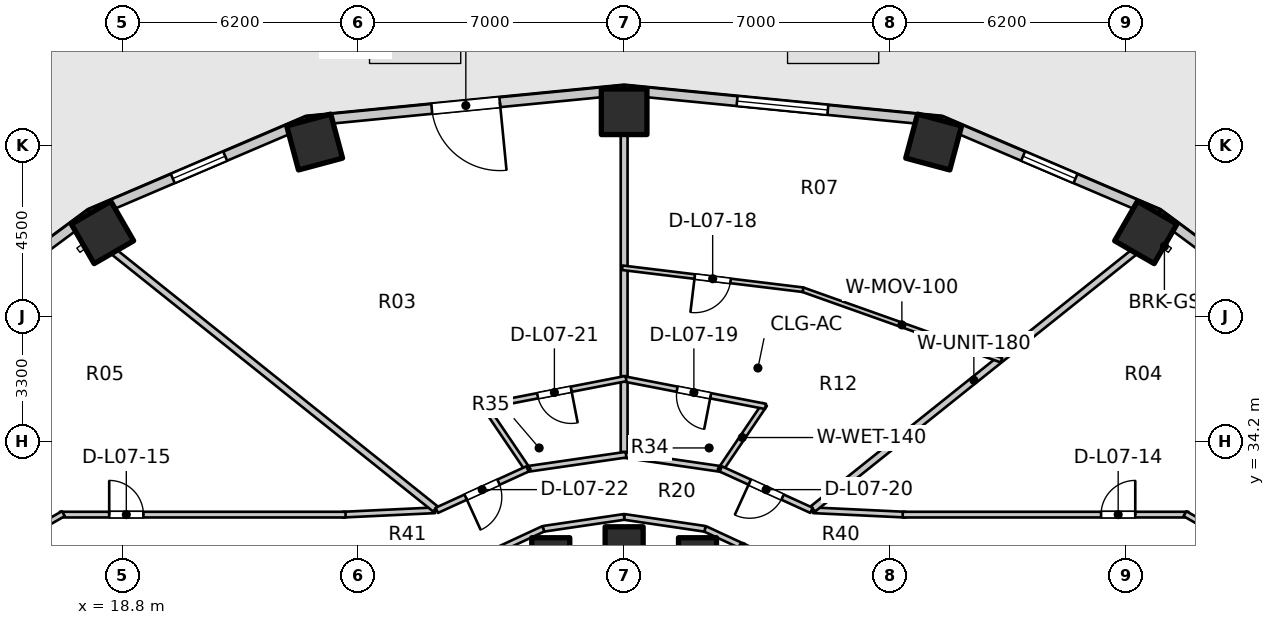
"""IFC4 building model, lengths in metres.
Left out: names, types, materials, properties, quantities, classifications, styles, units other than length and angle.
Written with IfcOpenShell. Run it as: python <this file> out.ifc"""

import sys

from ifc_helpers import new_model, si_unit, direction, frame, frame_2d, origin, origin_2d, place, context, subcontext, project, spatial, rectangle, extrude, element, fill, save


model = new_model("IFC4")
c1 = context("Model", 3, precision=1e-05, world=origin(), true_north=direction((0.0, 1.0)))
c2 = subcontext(c1, "Body", "Model", "MODEL_VIEW")
j1 = project(units=[si_unit("LENGTHUNIT", "METRE"), si_unit("PLANEANGLEUNIT", "RADIAN")], contexts=[c1])
p1 = place(None, origin())
s1 = spatial("IfcSite", under=j1, at=p1, CompositionType="ELEMENT")
p2 = place(p1, origin())
s2 = spatial("IfcBuilding", under=s1, at=p2, CompositionType="ELEMENT")
p3 = place(p2, frame((0.0, 0.0, 27.6)))
s3 = spatial("IfcBuildingStorey", under=s2, at=p3, CompositionType="ELEMENT", Elevation=27.6)
p4 = place(p3, frame((45.727, 39.704, 0.0), z_axis=(0.0, 0.0, 1.0), x_axis=(0.5, 0.866025403784, 0.0)))
e1 = element("IfcColumn", 1, at=p4, inside=s3, PredefinedType="COLUMN", context=c2, shape_type="SweptSolid", body=[
    extrude(rectangle(XDim=1.2, YDim=1.2, at=origin_2d()), origin(), (0.0, 0.0, 1.0), 3.1),
])
p5 = place(p3, frame((33.931, 31.172, 0.0), z_axis=(0.0, 0.0, 1.0), x_axis=(1.0, 0.0, 0.0)))
e2 = element("IfcColumn", 2, at=p5, inside=s3, PredefinedType="COLUMN", context=c2, shape_type="SweptSolid", body=[
    extrude(rectangle(XDim=1.0, YDim=1.0, at=origin_2d()), origin(), (0.0, 0.0, 1.0), 3.1),
])
p6 = place(p3, frame((40.145, 42.084, 0.0), z_axis=(0.0, 0.0, 1.0), x_axis=(0.258819045103, 0.965925826289, 0.0)))
e3 = element("IfcColumn", 3, at=p6, inside=s3, PredefinedType="COLUMN", context=c2, shape_type="SweptSolid", body=[
    extrude(rectangle(XDim=1.2, YDim=1.2, at=origin_2d()), origin(), (0.0, 0.0, 1.0), 3.1),
])
p7 = place(p3, frame((32.0, 31.46, 0.0), z_axis=(0.0, 0.0, 1.0), x_axis=(1.0, 0.0, 0.0)))
e4 = element("IfcColumn", 4, at=p7, inside=s3, PredefinedType="COLUMN", context=c2, shape_type="SweptSolid", body=[
    extrude(rectangle(XDim=1.0, YDim=1.0, at=origin_2d()), origin(), (0.0, 0.0, 1.0), 3.1),
])
p8 = place(p3, frame((32.0, 42.88, 0.0), z_axis=(0.0, 0.0, 1.0), x_axis=(0.0, 1.0, 0.0)))
e5 = element("IfcColumn", 5, at=p8, inside=s3, PredefinedType="COLUMN", context=c2, shape_type="SweptSolid", body=[
    extrude(rectangle(XDim=1.2, YDim=1.2, at=origin_2d()), origin(), (0.0, 0.0, 1.0), 3.1),
])
p9 = place(p3, frame((30.069, 31.172, 0.0), z_axis=(0.0, 0.0, 1.0), x_axis=(1.0, 0.0, 0.0)))
e6 = element("IfcColumn", 6, at=p9, inside=s3, PredefinedType="COLUMN", context=c2, shape_type="SweptSolid", body=[
    extrude(rectangle(XDim=1.0, YDim=1.0, at=origin_2d()), origin(), (0.0, 0.0, 1.0), 3.1),
])
for number, where, z_axis, x_axis in (
    (7, (23.855, 42.084, 0.0), (0.0, 0.0, 1.0), (-0.259, 0.966, 0.0)),
    (8, (18.273, 39.704, 0.0), (0.0, 0.0, 1.0), (-0.5, 0.866, 0.0)),
):
    element("IfcColumn", number, at=place(p3, frame(where, z_axis=z_axis, x_axis=x_axis)), inside=s3, PredefinedType="COLUMN", context=c2, shape_type="SweptSolid", body=[
        extrude(rectangle(XDim=1.2, YDim=1.2, at=origin_2d()), origin(), (0.0, 0.0, 1.0), 3.1),
    ])
p10 = place(p3, frame((50.405, 36.965, 0.0), z_axis=(0.0, 0.0, 1.0), x_axis=(-0.803477531792, 0.595335078679, 0.0)))
e9 = element("IfcWall", 9, at=p10, inside=s3, PredefinedType="STANDARD", context=c2, shape_type="SweptSolid", body=[
    extrude(rectangle(XDim=5.43, YDim=0.26, at=frame_2d((2.715, 0.0))), origin(), (0.0, 0.0, 1.0), 2.85),
])
p11 = place(p3, frame((46.042, 40.197, 0.0), z_axis=(0.0, 0.0, 1.0), x_axis=(-0.919612132394, 0.39282760335, 0.0)))
e10 = element("IfcWall", 10, at=p11, inside=s3, PredefinedType="STANDARD", context=c2, shape_type="SweptSolid", body=[
    extrude(rectangle(XDim=6.209, YDim=0.26, at=frame_2d((3.105, 0.0))), origin(), (0.0, 0.0, 1.0), 2.85),
])
p12 = place(p11, frame((2.355, 0.0, 0.75)))
e11 = element("IfcOpeningElement", 11, at=p12, cuts=e10, PredefinedType="OPENING", context=c2, shape_type="SweptSolid", body=[
    extrude(rectangle(XDim=1.5, YDim=1.6, at=frame_2d((0.75, 0.8))), frame((0.0, 0.14, 0.0), z_axis=(0.0, -1.0, 0.0), x_axis=(1.0, 0.0, 0.0)), (0.0, 0.0, 1.0), 0.28),
])
p13 = place(p3, frame((40.332, 42.636, 0.0), z_axis=(0.0, 0.0, 1.0), x_axis=(-0.995247718352, 0.097375454379, 0.0)))
e12 = element("IfcWall", 12, at=p13, inside=s3, PredefinedType="STANDARD", context=c2, shape_type="SweptSolid", body=[
    extrude(rectangle(XDim=8.372, YDim=0.26, at=frame_2d((4.186, 0.0))), origin(), (0.0, 0.0, 1.0), 2.85),
])
p14 = place(p13, frame((2.986, 0.0, 0.75)))
e13 = element("IfcOpeningElement", 13, at=p14, cuts=e12, PredefinedType="OPENING", context=c2, shape_type="SweptSolid", body=[
    extrude(rectangle(XDim=2.4, YDim=1.7, at=frame_2d((1.2, 0.85))), frame((0.0, 0.14, 0.0), z_axis=(0.0, -1.0, 0.0), x_axis=(1.0, 0.0, 0.0)), (0.0, 0.0, 1.0), 0.28),
])
p15 = place(p3, frame((32.0, 43.451, 0.0), z_axis=(0.0, 0.0, 1.0), x_axis=(-0.995247718352, -0.097375454379, 0.0)))
e14 = element("IfcWall", 14, at=p15, inside=s3, PredefinedType="STANDARD", context=c2, shape_type="SweptSolid", body=[
    extrude(rectangle(XDim=8.372, YDim=0.26, at=frame_2d((4.186, 0.0))), origin(), (0.0, 0.0, 1.0), 2.88),
])
p16 = place(p15, frame((3.286, 0.0, 0.0)))
e15 = element("IfcOpeningElement", 15, at=p16, cuts=e14, PredefinedType="OPENING", context=c2, shape_type="SweptSolid", body=[
    extrude(rectangle(XDim=1.8, YDim=2.35, at=frame_2d((0.9, 1.175))), frame((0.0, 0.14, 0.0), z_axis=(0.0, -1.0, 0.0), x_axis=(1.0, 0.0, 0.0)), (0.0, 0.0, 1.0), 0.28),
])
p17 = place(p3, frame((23.668, 42.636, 0.0), z_axis=(0.0, 0.0, 1.0), x_axis=(-0.919612132394, -0.39282760335, 0.0)))
e16 = element("IfcWall", 16, at=p17, inside=s3, PredefinedType="STANDARD", context=c2, shape_type="SweptSolid", body=[
    extrude(rectangle(XDim=6.209, YDim=0.26, at=frame_2d((3.105, 0.0))), origin(), (0.0, 0.0, 1.0), 2.85),
])
p18 = place(p17, frame((2.355, 0.0, 0.75)))
e17 = element("IfcOpeningElement", 17, at=p18, cuts=e16, PredefinedType="OPENING", context=c2, shape_type="SweptSolid", body=[
    extrude(rectangle(XDim=1.5, YDim=1.6, at=frame_2d((0.75, 0.8))), frame((0.0, 0.14, 0.0), z_axis=(0.0, -1.0, 0.0), x_axis=(1.0, 0.0, 0.0)), (0.0, 0.0, 1.0), 0.28),
])
p19 = place(p3, frame((17.958, 40.197, 0.0), z_axis=(0.0, 0.0, 1.0), x_axis=(-0.803477531792, -0.595335078679, 0.0)))
e18 = element("IfcWall", 18, at=p19, inside=s3, PredefinedType="STANDARD", context=c2, shape_type="SweptSolid", body=[
    extrude(rectangle(XDim=5.43, YDim=0.26, at=frame_2d((2.715, 0.0))), origin(), (0.0, 0.0, 1.0), 2.85),
])
p20 = place(p3, frame((36.11, 30.985, 0.0), z_axis=(0.0, 0.0, 1.0), x_axis=(-0.906943449489, 0.421252393975, 0.0)))
e19 = element("IfcWall", 19, at=p20, inside=s3, PredefinedType="PARTITIONING", context=c2, shape_type="SweptSolid", body=[
    extrude(rectangle(XDim=2.186, YDim=0.15, at=frame_2d((1.093, 0.0))), origin(), (0.0, 0.0, 1.0), 2.237),
])
for number, where, z_axis, x_axis in (
    (20, (34.127, 31.906, 0.0), (0.0, 0.0, 1.0), (-0.989, 0.146, 0.0)),
    (21, (32.0, 32.22, 0.0), (0.0, 0.0, 1.0), (-0.989, -0.146, 0.0)),
):
    element("IfcWall", number, at=place(p3, frame(where, z_axis=z_axis, x_axis=x_axis)), inside=s3, PredefinedType="PARTITIONING", context=c2, shape_type="SweptSolid", body=[
        extrude(rectangle(XDim=2.151, YDim=0.15, at=frame_2d((1.075, 0.0))), origin(), (0.0, 0.0, 1.0), 2.237),
    ])
p21 = place(p3, frame((29.873, 31.906, 0.0), z_axis=(0.0, 0.0, 1.0), x_axis=(-0.906943449489, -0.421252393975, 0.0)))
e22 = element("IfcWall", 22, at=p21, inside=s3, PredefinedType="PARTITIONING", context=c2, shape_type="SweptSolid", body=[
    extrude(rectangle(XDim=2.186, YDim=0.15, at=frame_2d((1.093, 0.0))), origin(), (0.0, 0.0, 1.0), 2.237),
])
p22 = place(p3, frame((36.98, 32.394, 0.0), z_axis=(0.0, 0.0, 1.0), x_axis=(0.998877427952, -0.047369651964, 0.0)))
e23 = element("IfcWall", 23, at=p22, inside=s3, PredefinedType="PARTITIONING", context=c2, shape_type="SweptSolid", body=[
    extrude(rectangle(XDim=2.433, YDim=0.15, at=frame_2d((1.216, 0.0))), origin(), (0.0, 0.0, 1.0), 2.237),
])
p23 = place(p3, frame((39.33, 32.28, 0.0), z_axis=(0.0, 0.0, 1.0), x_axis=(1.0, 0.0, 0.0)))
e24 = element("IfcWall", 24, at=p23, inside=s3, PredefinedType="PARTITIONING", context=c2, shape_type="SweptSolid", body=[
    extrude(rectangle(XDim=7.52, YDim=0.15, at=frame_2d((3.76, 0.0))), origin(), (0.0, 0.0, 1.0), 2.237),
])
p24 = place(p23, frame((5.22, 0.0, 0.0)))
e25 = element("IfcOpeningElement", 25, at=p24, cuts=e24, PredefinedType="OPENING", context=c2, shape_type="SweptSolid", body=[
    extrude(rectangle(XDim=0.9, YDim=2.1, at=frame_2d((0.45, 1.05))), frame((0.0, 0.085, 0.0), z_axis=(0.0, -1.0, 0.0), x_axis=(1.0, 0.0, 0.0)), (0.0, 0.0, 1.0), 0.17),
])
p25 = place(p3, frame((46.757, 32.305, 0.0), z_axis=(0.0, 0.0, 1.0), x_axis=(0.867991349648, -0.496579315857, 0.0)))
e26 = element("IfcWall", 26, at=p25, inside=s3, PredefinedType="PARTITIONING", context=c2, shape_type="SweptSolid", body=[
    extrude(rectangle(XDim=2.567, YDim=0.15, at=frame_2d((1.283, 0.0))), origin(), (0.0, 0.0, 1.0), 2.069),
])
p26 = place(p3, frame((27.02, 32.394, 0.0), z_axis=(0.0, 0.0, 1.0), x_axis=(-0.998877427952, -0.047369651964, 0.0)))
e27 = element("IfcWall", 27, at=p26, inside=s3, PredefinedType="PARTITIONING", context=c2, shape_type="SweptSolid", body=[
    extrude(rectangle(XDim=2.433, YDim=0.15, at=frame_2d((1.216, 0.0))), origin(), (0.0, 0.0, 1.0), 2.237),
])
p27 = place(p3, frame((17.15, 32.28, 0.0), z_axis=(0.0, 0.0, 1.0), x_axis=(1.0, 0.0, 0.0)))
e28 = element("IfcWall", 28, at=p27, inside=s3, PredefinedType="PARTITIONING", context=c2, shape_type="SweptSolid", body=[
    extrude(rectangle(XDim=7.52, YDim=0.15, at=frame_2d((3.76, 0.0))), origin(), (0.0, 0.0, 1.0), 2.237),
])
p28 = place(p27, frame((1.3, 0.0, 0.0)))
e29 = element("IfcOpeningElement", 29, at=p28, cuts=e28, PredefinedType="OPENING", context=c2, shape_type="SweptSolid", body=[
    extrude(rectangle(XDim=0.9, YDim=2.1, at=frame_2d((0.45, 1.05))), frame((0.0, 0.085, 0.0), z_axis=(0.0, -1.0, 0.0), x_axis=(1.0, 0.0, 0.0)), (0.0, 0.0, 1.0), 0.17),
])
p29 = place(p3, frame((17.243, 32.305, 0.0), z_axis=(0.0, 0.0, 1.0), x_axis=(-0.867991349648, -0.496579315857, 0.0)))
e30 = element("IfcWall", 30, at=p29, inside=s3, PredefinedType="PARTITIONING", context=c2, shape_type="SweptSolid", body=[
    extrude(rectangle(XDim=2.567, YDim=0.15, at=frame_2d((1.283, 0.0))), origin(), (0.0, 0.0, 1.0), 2.069),
])
p30 = place(p3, frame((36.968, 32.431, 0.0), z_axis=(0.0, 0.0, 1.0), x_axis=(0.781055486744, 0.624461629428, 0.0)))
e31 = element("IfcWall", 31, at=p30, inside=s3, PredefinedType="PARTITIONING", context=c2, shape_type="SweptSolid", body=[
    extrude(rectangle(XDim=10.843, YDim=0.18, at=frame_2d((5.422, 0.0))), origin(), (0.0, 0.0, 1.0), 2.237),
])
p31 = place(p3, frame((32.0, 33.905, 0.0), z_axis=(0.0, 0.0, 1.0), x_axis=(0.0, 1.0, 0.0)))
e32 = element("IfcWall", 32, at=p31, inside=s3, PredefinedType="PARTITIONING", context=c2, shape_type="SweptSolid", body=[
    extrude(rectangle(XDim=8.395, YDim=0.18, at=frame_2d((4.198, 0.0))), origin(), (0.0, 0.0, 1.0), 2.237),
])
p32 = place(p3, frame((27.032, 32.431, 0.0), z_axis=(0.0, 0.0, 1.0), x_axis=(-0.781055486744, 0.624461629428, 0.0)))
e33 = element("IfcWall", 33, at=p32, inside=s3, PredefinedType="PARTITIONING", context=c2, shape_type="SweptSolid", body=[
    extrude(rectangle(XDim=10.843, YDim=0.18, at=frame_2d((5.422, 0.0))), origin(), (0.0, 0.0, 1.0), 2.237),
])
p33 = place(p3, frame((41.928, 36.342, 0.0), z_axis=(0.0, 0.0, 1.0), x_axis=(-0.942369240096, 0.334574678243, 0.0)))
e34 = element("IfcWall", 34, at=p33, inside=s3, PredefinedType="MOVABLE", context=c2, shape_type="SweptSolid", body=[
    extrude(rectangle(XDim=5.559, YDim=0.12, at=frame_2d((2.779, 0.0))), origin(), (0.0, 0.0, 1.0), 2.237),
])
p34 = place(p3, frame((36.708, 38.197, 0.0), z_axis=(0.0, 0.0, 1.0), x_axis=(-0.992699076447, 0.120617343785, 0.0)))
e35 = element("IfcWall", 35, at=p34, inside=s3, PredefinedType="MOVABLE", context=c2, shape_type="SweptSolid", body=[
    extrude(rectangle(XDim=4.793, YDim=0.12, at=frame_2d((2.396, 0.0))), origin(), (0.0, 0.0, 1.0), 2.237),
])
p35 = place(p34, frame((1.922, 0.0, 0.0)))
e36 = element("IfcOpeningElement", 36, at=p35, cuts=e35, PredefinedType="OPENING", context=c2, shape_type="SweptSolid", body=[
    extrude(rectangle(XDim=0.95, YDim=2.1, at=frame_2d((0.475, 1.05))), frame((0.0, 0.07, 0.0), z_axis=(0.0, -1.0, 0.0), x_axis=(1.0, 0.0, 0.0)), (0.0, 0.0, 1.0), 0.14),
])
p36 = place(p3, frame((34.599, 33.473, 0.0), z_axis=(0.0, 0.0, 1.0), x_axis=(-0.989649898776, 0.143502884474, 0.0)))
e37 = element("IfcWall", 37, at=p36, inside=s3, PredefinedType="PARTITIONING", context=c2, shape_type="SweptSolid", body=[
    extrude(rectangle(XDim=2.676, YDim=0.15, at=frame_2d((1.338, 0.0))), origin(), (0.0, 0.0, 1.0), 2.237),
])
p37 = place(p3, frame((34.521, 33.439, 0.0), z_axis=(0.0, 0.0, 1.0), x_axis=(0.56056273171, 0.828111963335, 0.0)))
e38 = element("IfcWall", 38, at=p37, inside=s3, PredefinedType="PLUMBINGWALL", context=c2, shape_type="SweptSolid", body=[
    extrude(rectangle(XDim=2.1, YDim=0.14, at=frame_2d((1.05, 0.0))), origin(), (0.0, 0.0, 1.0), 2.855),
])
p38 = place(p3, frame((35.72, 35.127, 0.0), z_axis=(0.0, 0.0, 1.0), x_axis=(-0.981623000654, 0.190830512727, 0.0)))
e39 = element("IfcWall", 39, at=p38, inside=s3, PredefinedType="PLUMBINGWALL", context=c2, shape_type="SweptSolid", body=[
    extrude(rectangle(XDim=3.839, YDim=0.14, at=frame_2d((1.92, 0.0))), origin(), (0.0, 0.0, 1.0), 2.237),
])
p39 = place(p38, frame((1.47, 0.0, 0.0)))
e40 = element("IfcOpeningElement", 40, at=p39, cuts=e39, PredefinedType="OPENING", context=c2, shape_type="SweptSolid", body=[
    extrude(rectangle(XDim=0.9, YDim=2.1, at=frame_2d((0.45, 1.05))), frame((0.0, 0.08, 0.0), z_axis=(0.0, -1.0, 0.0), x_axis=(1.0, 0.0, 0.0)), (0.0, 0.0, 1.0), 0.16),
])
p40 = place(p3, frame((36.931, 32.393, 0.0), z_axis=(0.0, 0.0, 1.0), x_axis=(-0.909747571199, 0.415161843982, 0.0)))
e41 = element("IfcWall", 41, at=p40, inside=s3, PredefinedType="PARTITIONING", context=c2, shape_type="SweptSolid", body=[
    extrude(rectangle(XDim=2.625, YDim=0.15, at=frame_2d((1.312, 0.0))), origin(), (0.0, 0.0, 1.0), 2.237),
])
p41 = place(p40, frame((0.838, 0.0, 0.0)))
e42 = element("IfcOpeningElement", 42, at=p41, cuts=e41, PredefinedType="OPENING", context=c2, shape_type="SweptSolid", body=[
    extrude(rectangle(XDim=0.95, YDim=2.1, at=frame_2d((0.475, 1.05))), frame((0.0, 0.085, 0.0), z_axis=(0.0, -1.0, 0.0), x_axis=(1.0, 0.0, 0.0)), (0.0, 0.0, 1.0), 0.17),
])
p42 = place(p3, frame((32.05, 33.857, 0.0), z_axis=(0.0, 0.0, 1.0), x_axis=(-0.989649898776, -0.143502884474, 0.0)))
e43 = element("IfcWall", 43, at=p42, inside=s3, PredefinedType="PARTITIONING", context=c2, shape_type="SweptSolid", body=[
    extrude(rectangle(XDim=2.676, YDim=0.15, at=frame_2d((1.338, 0.0))), origin(), (0.0, 0.0, 1.0), 2.237),
])
p43 = place(p3, frame((29.479, 33.439, 0.0), z_axis=(0.0, 0.0, 1.0), x_axis=(-0.56056273171, 0.828111963335, 0.0)))
e44 = element("IfcWall", 44, at=p43, inside=s3, PredefinedType="PLUMBINGWALL", context=c2, shape_type="SweptSolid", body=[
    extrude(rectangle(XDim=2.1, YDim=0.14, at=frame_2d((1.05, 0.0))), origin(), (0.0, 0.0, 1.0), 2.855),
])
p44 = place(p3, frame((32.049, 35.86, 0.0), z_axis=(0.0, 0.0, 1.0), x_axis=(-0.981623000654, -0.190830512727, 0.0)))
e45 = element("IfcWall", 45, at=p44, inside=s3, PredefinedType="PLUMBINGWALL", context=c2, shape_type="SweptSolid", body=[
    extrude(rectangle(XDim=3.839, YDim=0.14, at=frame_2d((1.92, 0.0))), origin(), (0.0, 0.0, 1.0), 2.237),
])
p45 = place(p44, frame((1.47, 0.0, 0.0)))
e46 = element("IfcOpeningElement", 46, at=p45, cuts=e45, PredefinedType="OPENING", context=c2, shape_type="SweptSolid", body=[
    extrude(rectangle(XDim=0.9, YDim=2.1, at=frame_2d((0.45, 1.05))), frame((0.0, 0.08, 0.0), z_axis=(0.0, -1.0, 0.0), x_axis=(1.0, 0.0, 0.0)), (0.0, 0.0, 1.0), 0.16),
])
p46 = place(p3, frame((29.457, 33.482, 0.0), z_axis=(0.0, 0.0, 1.0), x_axis=(-0.909747571199, -0.415161843982, 0.0)))
e47 = element("IfcWall", 47, at=p46, inside=s3, PredefinedType="PARTITIONING", context=c2, shape_type="SweptSolid", body=[
    extrude(rectangle(XDim=2.625, YDim=0.15, at=frame_2d((1.312, 0.0))), origin(), (0.0, 0.0, 1.0), 2.237),
])
p47 = place(p46, frame((0.838, 0.0, 0.0)))
e48 = element("IfcOpeningElement", 48, at=p47, cuts=e47, PredefinedType="OPENING", context=c2, shape_type="SweptSolid", body=[
    extrude(rectangle(XDim=0.95, YDim=2.1, at=frame_2d((0.475, 1.05))), frame((0.0, 0.085, 0.0), z_axis=(0.0, -1.0, 0.0), x_axis=(1.0, 0.0, 0.0)), (0.0, 0.0, 1.0), 0.17),
])
p48 = place(p12, origin())
e49 = element("IfcWindow", 49, at=p48, inside=s3, PartitioningType="SINGLE_PANEL", PredefinedType="WINDOW", context=c2, shape_type="SweptSolid", body=[
    extrude(rectangle(XDim=1.5, YDim=1.6, at=frame_2d((0.75, 0.8))), frame((0.0, 0.03, 0.0), z_axis=(0.0, -1.0, 0.0), x_axis=(1.0, 0.0, 0.0)), (0.0, 0.0, 1.0), 0.06),
])
fill(e11, e49)
p49 = place(p14, origin())
e50 = element("IfcWindow", 50, at=p49, inside=s3, PartitioningType="SINGLE_PANEL", PredefinedType="WINDOW", context=c2, shape_type="SweptSolid", body=[
    extrude(rectangle(XDim=2.4, YDim=1.7, at=frame_2d((1.2, 0.85))), frame((0.0, 0.03, 0.0), z_axis=(0.0, -1.0, 0.0), x_axis=(1.0, 0.0, 0.0)), (0.0, 0.0, 1.0), 0.06),
])
fill(e13, e50)
p50 = place(p16, origin())
e51 = element("IfcDoor", 51, at=p50, inside=s3, OperationType="SINGLE_SWING_LEFT", PredefinedType="DOOR", context=c2, shape_type="SweptSolid", body=[
    extrude(rectangle(XDim=1.8, YDim=2.35, at=frame_2d((0.9, 1.175))), frame((0.0, 0.025, 0.0), z_axis=(0.0, -1.0, 0.0), x_axis=(1.0, 0.0, 0.0)), (0.0, 0.0, 1.0), 0.05),
])
fill(e15, e51)
p51 = place(p18, origin())
e52 = element("IfcWindow", 52, at=p51, inside=s3, PartitioningType="SINGLE_PANEL", PredefinedType="WINDOW", context=c2, shape_type="SweptSolid", body=[
    extrude(rectangle(XDim=1.5, YDim=1.6, at=frame_2d((0.75, 0.8))), frame((0.0, 0.03, 0.0), z_axis=(0.0, -1.0, 0.0), x_axis=(1.0, 0.0, 0.0)), (0.0, 0.0, 1.0), 0.06),
])
fill(e17, e52)
p52 = place(p24, origin())
e53 = element("IfcDoor", 53, at=p52, inside=s3, OperationType="SINGLE_SWING_RIGHT", PredefinedType="DOOR", context=c2, shape_type="SweptSolid", body=[
    extrude(rectangle(XDim=0.9, YDim=2.1, at=frame_2d((0.45, 1.05))), frame((0.0, 0.025, 0.0), z_axis=(0.0, -1.0, 0.0), x_axis=(1.0, 0.0, 0.0)), (0.0, 0.0, 1.0), 0.05),
])
fill(e25, e53)
p53 = place(p28, origin())
e54 = element("IfcDoor", 54, at=p53, inside=s3, OperationType="SINGLE_SWING_LEFT", PredefinedType="DOOR", context=c2, shape_type="SweptSolid", body=[
    extrude(rectangle(XDim=0.9, YDim=2.1, at=frame_2d((0.45, 1.05))), frame((0.0, 0.025, 0.0), z_axis=(0.0, -1.0, 0.0), x_axis=(1.0, 0.0, 0.0)), (0.0, 0.0, 1.0), 0.05),
])
fill(e29, e54)
p54 = place(p35, origin())
e55 = element("IfcDoor", 55, at=p54, inside=s3, OperationType="SINGLE_SWING_RIGHT", PredefinedType="DOOR", context=c2, shape_type="SweptSolid", body=[
    extrude(rectangle(XDim=0.95, YDim=2.1, at=frame_2d((0.475, 1.05))), frame((0.0, 0.025, 0.0), z_axis=(0.0, -1.0, 0.0), x_axis=(1.0, 0.0, 0.0)), (0.0, 0.0, 1.0), 0.05),
])
fill(e36, e55)
p55 = place(p39, origin())
e56 = element("IfcDoor", 56, at=p55, inside=s3, OperationType="SINGLE_SWING_LEFT", PredefinedType="DOOR", context=c2, shape_type="SweptSolid", body=[
    extrude(rectangle(XDim=0.9, YDim=2.1, at=frame_2d((0.45, 1.05))), frame((0.0, 0.025, 0.0), z_axis=(0.0, -1.0, 0.0), x_axis=(1.0, 0.0, 0.0)), (0.0, 0.0, 1.0), 0.05),
])
fill(e40, e56)
p56 = place(p41, origin())
e57 = element("IfcDoor", 57, at=p56, inside=s3, OperationType="SINGLE_SWING_RIGHT", PredefinedType="DOOR", context=c2, shape_type="SweptSolid", body=[
    extrude(rectangle(XDim=0.95, YDim=2.1, at=frame_2d((0.475, 1.05))), frame((0.0, 0.025, 0.0), z_axis=(0.0, -1.0, 0.0), x_axis=(1.0, 0.0, 0.0)), (0.0, 0.0, 1.0), 0.05),
])
fill(e42, e57)
p57 = place(p45, origin())
e58 = element("IfcDoor", 58, at=p57, inside=s3, OperationType="SINGLE_SWING_LEFT", PredefinedType="DOOR", context=c2, shape_type="SweptSolid", body=[
    extrude(rectangle(XDim=0.9, YDim=2.1, at=frame_2d((0.45, 1.05))), frame((0.0, 0.025, 0.0), z_axis=(0.0, -1.0, 0.0), x_axis=(1.0, 0.0, 0.0)), (0.0, 0.0, 1.0), 0.05),
])
fill(e46, e58)
p58 = place(p47, origin())
e59 = element("IfcDoor", 59, at=p58, inside=s3, OperationType="SINGLE_SWING_RIGHT", PredefinedType="DOOR", context=c2, shape_type="SweptSolid", body=[
    extrude(rectangle(XDim=0.95, YDim=2.1, at=frame_2d((0.475, 1.05))), frame((0.0, 0.025, 0.0), z_axis=(0.0, -1.0, 0.0), x_axis=(1.0, 0.0, 0.0)), (0.0, 0.0, 1.0), 0.05),
])
fill(e48, e59)
save(model, sys.argv[1])
